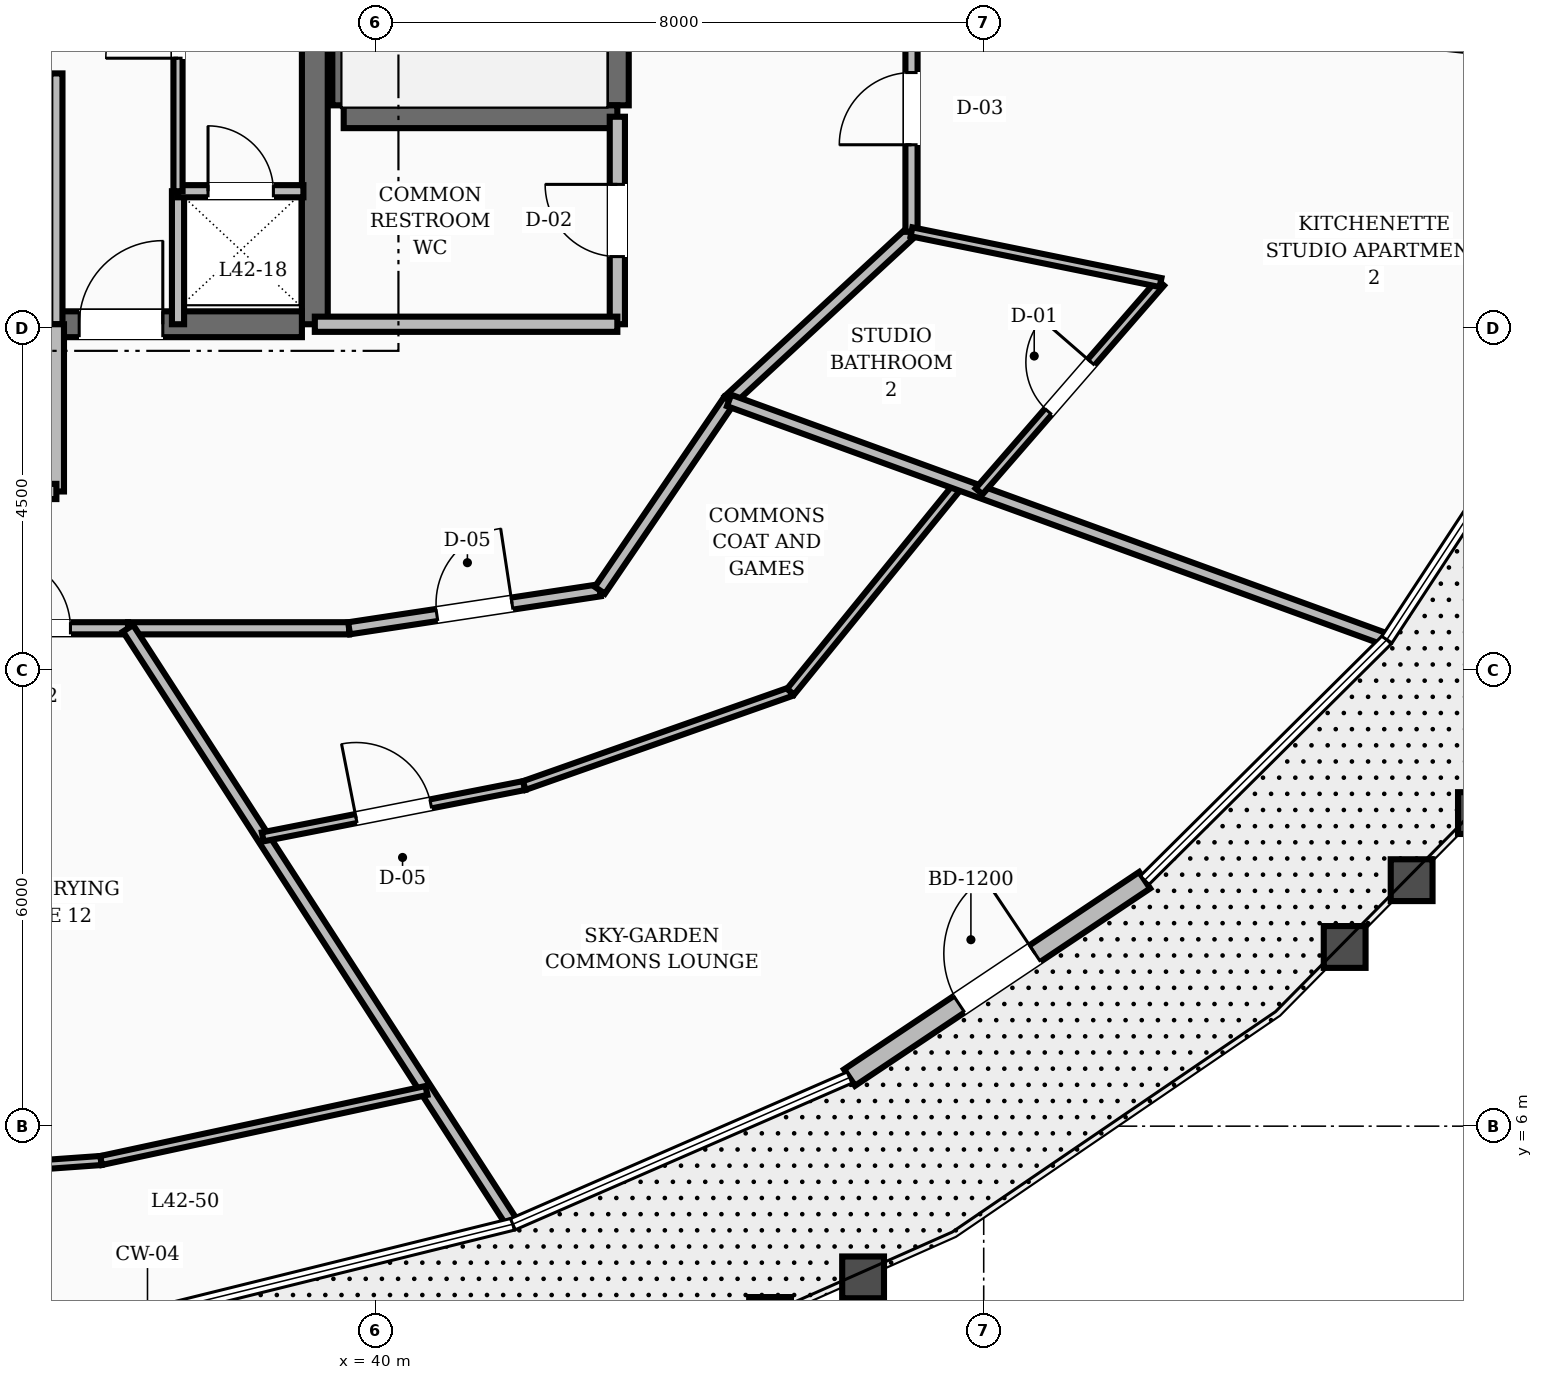
"""IFC4 building model, lengths in metres.
Left out: names, types, materials, properties, quantities, classifications, styles, units other than length and angle.
Written with IfcOpenShell. Run it as: python <this file> out.ifc"""

import sys

from ifc_helpers import new_model, si_unit, direction, frame, frame_2d, origin, place, context, subcontext, project, spatial, rectangle, extrude, element, fill, save


model = new_model("IFC4")
c1 = context("Model", 3, precision=1e-05, world=origin(), true_north=direction((0.0, 1.0)))
c2 = subcontext(c1, "Body", "Model", "MODEL_VIEW")
j1 = project(units=[si_unit("LENGTHUNIT", "METRE"), si_unit("PLANEANGLEUNIT", "RADIAN")], contexts=[c1])
p1 = place(None, origin())
s1 = spatial("IfcSite", under=j1, at=p1, CompositionType="ELEMENT")
p2 = place(p1, origin())
s2 = spatial("IfcBuilding", under=s1, at=p2, CompositionType="ELEMENT")
p3 = place(p2, frame((0.0, 0.0, 164.0)))
s3 = spatial("IfcBuildingStorey", under=s2, at=p3, CompositionType="ELEMENT", Elevation=164.0)
p4 = place(p3, frame((39.2, 16.55, 0.0), z_axis=(0.0, 0.0, 1.0), x_axis=(0.0, 1.0, 0.0)))
e1 = element("IfcWall", 1, at=p4, inside=s3, PredefinedType="SHEAR", context=c2, shape_type="SweptSolid", body=[
    extrude(rectangle(XDim=6.3, YDim=0.34, at=frame_2d((3.15, 0.0))), origin(), (0.0, 0.0, 1.0), 3.6),
])
p5 = place(p3, frame((35.8, 16.55, 0.0), z_axis=(0.0, 0.0, 1.0), x_axis=(1.0, 0.0, 0.0)))
e2 = element("IfcWall", 2, at=p5, inside=s3, PredefinedType="SHEAR", context=c2, shape_type="SweptSolid", body=[
    extrude(rectangle(XDim=3.23, YDim=0.34, at=frame_2d((1.615, 0.0))), origin(), (0.0, 0.0, 1.0), 3.6),
])
p6 = place(p5, frame((0.3, 0.0, 0.0)))
e3 = element("IfcOpeningElement", 3, at=p6, cuts=e2, PredefinedType="OPENING", context=c2, shape_type="SweptSolid", body=[
    extrude(rectangle(XDim=1.1, YDim=2.1, at=frame_2d((0.55, 1.05))), frame((0.0, 0.18, 0.0), z_axis=(0.0, -1.0, 0.0), x_axis=(1.0, 0.0, 0.0)), (0.0, 0.0, 1.0), 0.36),
])
for number, where, z_axis, x_axis in (
    (4, (43.18, 19.43, 0.0), (0.0, 0.0, 1.0), (0.0, 1.0, 0.0)),
    (5, (39.58, 19.43, 0.0), (0.0, 0.0, 1.0), (0.0, 1.0, 0.0)),
):
    element("IfcWall", number, at=place(p3, frame(where, z_axis=z_axis, x_axis=x_axis)), inside=s3, PredefinedType="SHEAR", context=c2, shape_type="SweptSolid", body=[
        extrude(rectangle(XDim=8.74, YDim=0.3, at=frame_2d((4.37, 0.0))), origin(), (0.0, 0.0, 1.0), 3.6),
    ])
p7 = place(p3, frame((39.58, 19.28, 0.0), z_axis=(0.0, 0.0, 1.0), x_axis=(1.0, 0.0, 0.0)))
e6 = element("IfcWall", 6, at=p7, inside=s3, PredefinedType="SHEAR", context=c2, shape_type="SweptSolid", body=[
    extrude(rectangle(XDim=3.6, YDim=0.3, at=frame_2d((1.8, 0.0))), origin(), (0.0, 0.0, 1.0), 3.6),
])
p8 = place(p3, frame((46.235, 6.639, 0.0), z_axis=(0.0, 0.0, 1.0), x_axis=(0.831245321174, 0.555905761821, 0.0)))
e7 = element("IfcWall", 7, at=p8, inside=s3, PredefinedType="STANDARD", context=c2, shape_type="SweptSolid", body=[
    extrude(rectangle(XDim=4.671, YDim=0.26, at=frame_2d((2.335, 0.0))), origin(), (0.0, 0.0, 1.0), 2.82),
])
p9 = place(p8, frame((1.736, 0.0, 0.0)))
e8 = element("IfcOpeningElement", 8, at=p9, cuts=e7, PredefinedType="OPENING", context=c2, shape_type="SweptSolid", body=[
    extrude(rectangle(XDim=1.2, YDim=2.15, at=frame_2d((0.6, 1.075))), frame((0.0, 0.14, 0.0), z_axis=(0.0, -1.0, 0.0), x_axis=(1.0, 0.0, 0.0)), (0.0, 0.0, 1.0), 0.28),
])
p10 = place(p3, frame((43.18, 16.55, 0.0), z_axis=(0.0, 0.0, 1.0), x_axis=(0.0, 1.0, 0.0)))
e9 = element("IfcWall", 9, at=p10, inside=s3, PredefinedType="SOLIDWALL", context=c2, shape_type="SweptSolid", body=[
    extrude(rectangle(XDim=2.73, YDim=0.2, at=frame_2d((1.365, 0.0))), origin(), (0.0, 0.0, 1.0), 2.8),
])
p11 = place(p10, frame((0.89, 0.0, 0.0)))
e10 = element("IfcOpeningElement", 10, at=p11, cuts=e9, PredefinedType="OPENING", context=c2, shape_type="SweptSolid", body=[
    extrude(rectangle(XDim=0.95, YDim=2.1, at=frame_2d((0.475, 1.05))), frame((0.0, 0.11, 0.0), z_axis=(0.0, -1.0, 0.0), x_axis=(1.0, 0.0, 0.0)), (0.0, 0.0, 1.0), 0.22),
])
p12 = place(p3, frame((39.2, 16.55, 0.0), z_axis=(0.0, 0.0, 1.0), x_axis=(1.0, 0.0, 0.0)))
e11 = element("IfcWall", 11, at=p12, inside=s3, PredefinedType="SOLIDWALL", context=c2, shape_type="SweptSolid", body=[
    extrude(rectangle(XDim=3.98, YDim=0.2, at=frame_2d((1.99, 0.0))), origin(), (0.0, 0.0, 1.0), 2.8),
])
p13 = place(p3, frame((35.8, 16.55, 0.0), z_axis=(0.0, 0.0, 1.0), x_axis=(0.0, 1.0, 0.0)))
e12 = element("IfcWall", 12, at=p13, inside=s3, PredefinedType="SOLIDWALL", context=c2, shape_type="SweptSolid", body=[
    extrude(rectangle(XDim=3.3, YDim=0.16, at=frame_2d((1.65, 0.0))), origin(), (0.0, 0.0, 1.0), 2.8),
])
p14 = place(p3, frame((37.4, 16.55, 0.0), z_axis=(0.0, 0.0, 1.0), x_axis=(0.0, 1.0, 0.0)))
e13 = element("IfcWall", 13, at=p14, inside=s3, PredefinedType="SOLIDWALL", context=c2, shape_type="SweptSolid", body=[
    extrude(rectangle(XDim=1.75, YDim=0.16, at=frame_2d((0.875, 0.0))), origin(), (0.0, 0.0, 1.0), 2.8),
])
p15 = place(p3, frame((35.8, 14.35, 0.0), z_axis=(0.0, 0.0, 1.0), x_axis=(0.0, 1.0, 0.0)))
e14 = element("IfcWall", 14, at=p15, inside=s3, PredefinedType="SOLIDWALL", context=c2, shape_type="SweptSolid", body=[
    extrude(rectangle(XDim=2.2, YDim=0.2, at=frame_2d((1.1, 0.0))), origin(), (0.0, 0.0, 1.0), 2.8),
])
p16 = place(p3, frame((28.2, 14.35, 0.0), z_axis=(0.0, 0.0, 1.0), x_axis=(1.0, 0.0, 0.0)))
e15 = element("IfcWall", 15, at=p16, inside=s3, PredefinedType="SOLIDWALL", context=c2, shape_type="SweptSolid", body=[
    extrude(rectangle(XDim=7.6, YDim=0.2, at=frame_2d((3.8, 0.0))), origin(), (0.0, 0.0, 1.0), 2.8),
])
p17 = place(p16, frame((3.2, 0.0, 0.0)))
e16 = element("IfcOpeningElement", 16, at=p17, cuts=e15, PredefinedType="OPENING", context=c2, shape_type="SweptSolid", body=[
    extrude(rectangle(XDim=1.2, YDim=2.1, at=frame_2d((0.6, 1.05))), frame((0.0, 0.11, 0.0), z_axis=(0.0, -1.0, 0.0), x_axis=(1.0, 0.0, 0.0)), (0.0, 0.0, 1.0), 0.22),
])
p18 = place(p3, frame((37.4, 18.3, 0.0), z_axis=(0.0, 0.0, 1.0), x_axis=(1.0, 0.0, 0.0)))
e17 = element("IfcWall", 17, at=p18, inside=s3, PredefinedType="SOLIDWALL", context=c2, shape_type="SweptSolid", body=[
    extrude(rectangle(XDim=1.65, YDim=0.16, at=frame_2d((0.825, 0.0))), origin(), (0.0, 0.0, 1.0), 2.8),
])
p19 = place(p18, frame((0.395, 0.0, 0.0)))
e18 = element("IfcOpeningElement", 18, at=p19, cuts=e17, PredefinedType="OPENING", context=c2, shape_type="SweptSolid", body=[
    extrude(rectangle(XDim=0.86, YDim=2.1, at=frame_2d((0.43, 1.05))), frame((0.0, 0.09, 0.0), z_axis=(0.0, -1.0, 0.0), x_axis=(1.0, 0.0, 0.0)), (0.0, 0.0, 1.0), 0.18),
])
p20 = place(p3, frame((37.4, 18.3, 0.0), z_axis=(0.0, 0.0, 1.0), x_axis=(0.0, 1.0, 0.0)))
e19 = element("IfcWall", 19, at=p20, inside=s3, PredefinedType="PARTITIONING", context=c2, shape_type="SweptSolid", body=[
    extrude(rectangle(XDim=4.45, YDim=0.12, at=frame_2d((2.225, 0.0))), origin(), (0.0, 0.0, 1.0), 2.8),
])
p21 = place(p20, frame((1.75, 0.0, 0.0)))
e20 = element("IfcOpeningElement", 20, at=p21, cuts=e19, PredefinedType="OPENING", context=c2, shape_type="SweptSolid", body=[
    extrude(rectangle(XDim=0.95, YDim=2.1, at=frame_2d((0.475, 1.05))), frame((0.0, 0.07, 0.0), z_axis=(0.0, -1.0, 0.0), x_axis=(1.0, 0.0, 0.0)), (0.0, 0.0, 1.0), 0.14),
])
p22 = place(p3, frame((34.278, 12.55, 0.0), z_axis=(0.0, 0.0, 1.0), x_axis=(1.0, 0.0, 0.0)))
e21 = element("IfcWall", 21, at=p22, inside=s3, PredefinedType="SOLIDWALL", context=c2, shape_type="SweptSolid", body=[
    extrude(rectangle(XDim=2.465, YDim=0.16, at=frame_2d((1.232, 0.0))), origin(), (0.0, 0.0, 1.0), 2.8),
])
p23 = place(p22, frame((0.758, 0.0, 0.0)))
e22 = element("IfcOpeningElement", 22, at=p23, cuts=e21, PredefinedType="OPENING", context=c2, shape_type="SweptSolid", body=[
    extrude(rectangle(XDim=0.95, YDim=2.1, at=frame_2d((0.475, 1.05))), frame((0.0, 0.09, 0.0), z_axis=(0.0, -1.0, 0.0), x_axis=(1.0, 0.0, 0.0)), (0.0, 0.0, 1.0), 0.18),
])
p24 = place(p3, frame((36.743, 12.55, 0.0), z_axis=(0.0, 0.0, 1.0), x_axis=(1.0, 0.0, 0.0)))
e23 = element("IfcWall", 23, at=p24, inside=s3, PredefinedType="SOLIDWALL", context=c2, shape_type="SweptSolid", body=[
    extrude(rectangle(XDim=2.908, YDim=0.16, at=frame_2d((1.454, 0.0))), origin(), (0.0, 0.0, 1.0), 2.8),
])
p25 = place(p3, frame((39.651, 12.55, 0.0), z_axis=(0.0, 0.0, 1.0), x_axis=(0.988710906508, 0.149835721217, 0.0)))
e24 = element("IfcWall", 24, at=p25, inside=s3, PredefinedType="SOLIDWALL", context=c2, shape_type="SweptSolid", body=[
    extrude(rectangle(XDim=3.337, YDim=0.16, at=frame_2d((1.668, 0.0))), origin(), (0.0, 0.0, 1.0), 2.8),
])
p26 = place(p25, frame((1.168, 0.0, 0.0)))
e25 = element("IfcOpeningElement", 25, at=p26, cuts=e24, PredefinedType="OPENING", context=c2, shape_type="SweptSolid", body=[
    extrude(rectangle(XDim=1.0, YDim=2.1, at=frame_2d((0.5, 1.05))), frame((0.0, 0.09, 0.0), z_axis=(0.0, -1.0, 0.0), x_axis=(1.0, 0.0, 0.0)), (0.0, 0.0, 1.0), 0.18),
])
p27 = place(p3, frame((42.95, 13.05, 0.0), z_axis=(0.0, 0.0, 1.0), x_axis=(0.562674669208, 0.826678423955, 0.0)))
e26 = element("IfcWall", 26, at=p27, inside=s3, PredefinedType="SOLIDWALL", context=c2, shape_type="SweptSolid", body=[
    extrude(rectangle(XDim=3.021, YDim=0.16, at=frame_2d((1.511, 0.0))), origin(), (0.0, 0.0, 1.0), 2.8),
])
p28 = place(p3, frame((44.65, 15.548, 0.0), z_axis=(0.0, 0.0, 1.0), x_axis=(0.734347936521, 0.678773237633, 0.0)))
e27 = element("IfcWall", 27, at=p28, inside=s3, PredefinedType="SOLIDWALL", context=c2, shape_type="SweptSolid", body=[
    extrude(rectangle(XDim=3.268, YDim=0.16, at=frame_2d((1.634, 0.0))), origin(), (0.0, 0.0, 1.0), 2.8),
])
p29 = place(p3, frame((47.05, 17.766, 0.0), z_axis=(0.0, 0.0, 1.0), x_axis=(0.0, 1.0, 0.0)))
e28 = element("IfcWall", 28, at=p29, inside=s3, PredefinedType="SOLIDWALL", context=c2, shape_type="SweptSolid", body=[
    extrude(rectangle(XDim=3.24, YDim=0.16, at=frame_2d((1.62, 0.0))), origin(), (0.0, 0.0, 1.0), 2.8),
])
p30 = place(p29, frame((1.145, 0.0, 0.0)))
e29 = element("IfcOpeningElement", 29, at=p30, cuts=e28, PredefinedType="OPENING", context=c2, shape_type="SweptSolid", body=[
    extrude(rectangle(XDim=0.95, YDim=2.1, at=frame_2d((0.475, 1.05))), frame((0.0, 0.09, 0.0), z_axis=(0.0, -1.0, 0.0), x_axis=(1.0, 0.0, 0.0)), (0.0, 0.0, 1.0), 0.18),
])
p31 = place(p3, frame((36.743, 12.55, 0.0), z_axis=(0.0, 0.0, 1.0), x_axis=(0.542459310628, -0.840082077129, 0.0)))
e30 = element("IfcWall", 30, at=p31, inside=s3, PredefinedType="SOLIDWALL", context=c2, shape_type="SweptSolid", body=[
    extrude(rectangle(XDim=9.282, YDim=0.16, at=frame_2d((4.641, 0.0))), origin(), (0.0, 0.0, 1.0), 2.8),
])
p32 = place(p3, frame((38.515, 9.806, 0.0), z_axis=(0.0, 0.0, 1.0), x_axis=(0.981276091141, 0.192606419819, 0.0)))
e31 = element("IfcWall", 31, at=p32, inside=s3, PredefinedType="PARTITIONING", context=c2, shape_type="SweptSolid", body=[
    extrude(rectangle(XDim=3.506, YDim=0.12, at=frame_2d((1.753, 0.0))), origin(), (0.0, 0.0, 1.0), 2.8),
])
p33 = place(p32, frame((1.253, 0.0, 0.0)))
e32 = element("IfcOpeningElement", 32, at=p33, cuts=e31, PredefinedType="OPENING", context=c2, shape_type="SweptSolid", body=[
    extrude(rectangle(XDim=1.0, YDim=2.1, at=frame_2d((0.5, 1.05))), frame((0.0, 0.07, 0.0), z_axis=(0.0, -1.0, 0.0), x_axis=(1.0, 0.0, 0.0)), (0.0, 0.0, 1.0), 0.14),
])
p34 = place(p3, frame((41.955, 10.481, 0.0), z_axis=(0.0, 0.0, 1.0), x_axis=(0.943218228091, 0.332173710875, 0.0)))
e33 = element("IfcWall", 33, at=p34, inside=s3, PredefinedType="PARTITIONING", context=c2, shape_type="SweptSolid", body=[
    extrude(rectangle(XDim=3.715, YDim=0.12, at=frame_2d((1.857, 0.0))), origin(), (0.0, 0.0, 1.0), 2.8),
])
p35 = place(p3, frame((45.459, 11.715, 0.0), z_axis=(0.0, 0.0, 1.0), x_axis=(0.630851136321, 0.775903888251, 0.0)))
e34 = element("IfcWall", 34, at=p35, inside=s3, PredefinedType="PARTITIONING", context=c2, shape_type="SweptSolid", body=[
    extrude(rectangle(XDim=3.519, YDim=0.12, at=frame_2d((1.76, 0.0))), origin(), (0.0, 0.0, 1.0), 2.8),
])
p36 = place(p3, frame((44.65, 15.548, 0.0), z_axis=(0.0, 0.0, 1.0), x_axis=(0.939767737395, -0.341813691579, 0.0)))
e35 = element("IfcWall", 35, at=p36, inside=s3, PredefinedType="SOLIDWALL", context=c2, shape_type="SweptSolid", body=[
    extrude(rectangle(XDim=9.159, YDim=0.16, at=frame_2d((4.58, 0.0))), origin(), (0.0, 0.0, 1.0), 2.8),
])
p37 = place(p3, frame((47.939, 14.351, 0.0), z_axis=(0.0, 0.0, 1.0), x_axis=(0.655979420757, 0.754778775233, 0.0)))
e36 = element("IfcWall", 36, at=p37, inside=s3, PredefinedType="PARTITIONING", context=c2, shape_type="SweptSolid", body=[
    extrude(rectangle(XDim=3.64, YDim=0.12, at=frame_2d((1.82, 0.0))), origin(), (0.0, 0.0, 1.0), 2.8),
])
p38 = place(p37, frame((1.39, 0.0, 0.0)))
e37 = element("IfcOpeningElement", 37, at=p38, cuts=e36, PredefinedType="OPENING", context=c2, shape_type="SweptSolid", body=[
    extrude(rectangle(XDim=0.86, YDim=2.1, at=frame_2d((0.43, 1.05))), frame((0.0, 0.07, 0.0), z_axis=(0.0, -1.0, 0.0), x_axis=(1.0, 0.0, 0.0)), (0.0, 0.0, 1.0), 0.14),
])
p39 = place(p3, frame((47.05, 17.766, 0.0), z_axis=(0.0, 0.0, 1.0), x_axis=(0.97987231708, -0.199625254463, 0.0)))
e38 = element("IfcWall", 38, at=p39, inside=s3, PredefinedType="PARTITIONING", context=c2, shape_type="SweptSolid", body=[
    extrude(rectangle(XDim=3.344, YDim=0.12, at=frame_2d((1.672, 0.0))), origin(), (0.0, 0.0, 1.0), 2.8),
])
p40 = place(p3, frame((47.05, 21.006, 0.0), z_axis=(0.0, 0.0, 1.0), x_axis=(0.994311076529, -0.106515177757, 0.0)))
e39 = element("IfcWall", 39, at=p40, inside=s3, PredefinedType="SOLIDWALL", context=c2, shape_type="SweptSolid", body=[
    extrude(rectangle(XDim=10.087, YDim=0.16, at=frame_2d((5.044, 0.0))), origin(), (0.0, 0.0, 1.0), 2.8),
])
p41 = place(p3, frame((32.0, 5.237, 0.0), z_axis=(0.0, 0.0, 1.0), x_axis=(0.997496872259, 0.070710606235, 0.0)))
e40 = element("IfcWall", 40, at=p41, inside=s3, PredefinedType="PARTITIONING", context=c2, shape_type="SweptSolid", body=[
    extrude(rectangle(XDim=4.399, YDim=0.12, at=frame_2d((2.199, 0.0))), origin(), (0.0, 0.0, 1.0), 2.8),
])
p42 = place(p41, frame((1.724, 0.0, 0.0)))
e41 = element("IfcOpeningElement", 41, at=p42, cuts=e40, PredefinedType="OPENING", context=c2, shape_type="SweptSolid", body=[
    extrude(rectangle(XDim=0.95, YDim=2.1, at=frame_2d((0.475, 1.05))), frame((0.0, 0.07, 0.0), z_axis=(0.0, -1.0, 0.0), x_axis=(1.0, 0.0, 0.0)), (0.0, 0.0, 1.0), 0.14),
])
p43 = place(p3, frame((36.388, 5.548, 0.0), z_axis=(0.0, 0.0, 1.0), x_axis=(0.977604548962, 0.210450340576, 0.0)))
e42 = element("IfcWall", 42, at=p43, inside=s3, PredefinedType="PARTITIONING", context=c2, shape_type="SweptSolid", body=[
    extrude(rectangle(XDim=4.379, YDim=0.12, at=frame_2d((2.19, 0.0))), origin(), (0.0, 0.0, 1.0), 2.8),
])
p44 = place(p9, origin())
e43 = element("IfcDoor", 43, at=p44, inside=s3, OperationType="SINGLE_SWING_RIGHT", PredefinedType="DOOR", context=c2, shape_type="SweptSolid", body=[
    extrude(rectangle(XDim=1.2, YDim=2.15, at=frame_2d((0.6, 1.075))), frame((0.0, 0.025, 0.0), z_axis=(0.0, -1.0, 0.0), x_axis=(1.0, 0.0, 0.0)), (0.0, 0.0, 1.0), 0.05),
])
fill(e8, e43)
p45 = place(p11, origin())
e44 = element("IfcDoor", 44, at=p45, inside=s3, OperationType="SINGLE_SWING_RIGHT", PredefinedType="DOOR", context=c2, shape_type="SweptSolid", body=[
    extrude(rectangle(XDim=0.95, YDim=2.1, at=frame_2d((0.475, 1.05))), frame((0.0, 0.025, 0.0), z_axis=(0.0, -1.0, 0.0), x_axis=(1.0, 0.0, 0.0)), (0.0, 0.0, 1.0), 0.05),
])
fill(e10, e44)
p46 = place(p6, origin())
e45 = element("IfcDoor", 45, at=p46, inside=s3, OperationType="SINGLE_SWING_RIGHT", PredefinedType="DOOR", context=c2, shape_type="SweptSolid", body=[
    extrude(rectangle(XDim=1.1, YDim=2.1, at=frame_2d((0.55, 1.05))), frame((0.0, 0.025, 0.0), z_axis=(0.0, -1.0, 0.0), x_axis=(1.0, 0.0, 0.0)), (0.0, 0.0, 1.0), 0.05),
])
fill(e3, e45)
p47 = place(p19, origin())
e46 = element("IfcDoor", 46, at=p47, inside=s3, OperationType="SINGLE_SWING_LEFT", PredefinedType="TRAPDOOR", context=c2, shape_type="SweptSolid", body=[
    extrude(rectangle(XDim=0.86, YDim=2.1, at=frame_2d((0.43, 1.05))), frame((0.0, 0.025, 0.0), z_axis=(0.0, -1.0, 0.0), x_axis=(1.0, 0.0, 0.0)), (0.0, 0.0, 1.0), 0.05),
])
fill(e18, e46)
p48 = place(p21, origin())
e47 = element("IfcDoor", 47, at=p48, inside=s3, OperationType="SINGLE_SWING_LEFT", PredefinedType="DOOR", context=c2, shape_type="SweptSolid", body=[
    extrude(rectangle(XDim=0.95, YDim=2.1, at=frame_2d((0.475, 1.05))), frame((0.0, 0.025, 0.0), z_axis=(0.0, -1.0, 0.0), x_axis=(1.0, 0.0, 0.0)), (0.0, 0.0, 1.0), 0.05),
])
fill(e20, e47)
p49 = place(p26, origin())
e48 = element("IfcDoor", 48, at=p49, inside=s3, OperationType="SINGLE_SWING_RIGHT", PredefinedType="DOOR", context=c2, shape_type="SweptSolid", body=[
    extrude(rectangle(XDim=1.0, YDim=2.1, at=frame_2d((0.5, 1.05))), frame((0.0, 0.025, 0.0), z_axis=(0.0, -1.0, 0.0), x_axis=(1.0, 0.0, 0.0)), (0.0, 0.0, 1.0), 0.05),
])
fill(e25, e48)
p50 = place(p33, origin())
e49 = element("IfcDoor", 49, at=p50, inside=s3, OperationType="SINGLE_SWING_LEFT", PredefinedType="DOOR", context=c2, shape_type="SweptSolid", body=[
    extrude(rectangle(XDim=1.0, YDim=2.1, at=frame_2d((0.5, 1.05))), frame((0.0, 0.025, 0.0), z_axis=(0.0, -1.0, 0.0), x_axis=(1.0, 0.0, 0.0)), (0.0, 0.0, 1.0), 0.05),
])
fill(e32, e49)
p51 = place(p38, origin())
e50 = element("IfcDoor", 50, at=p51, inside=s3, OperationType="SINGLE_SWING_RIGHT", PredefinedType="DOOR", context=c2, shape_type="SweptSolid", body=[
    extrude(rectangle(XDim=0.86, YDim=2.1, at=frame_2d((0.43, 1.05))), frame((0.0, 0.025, 0.0), z_axis=(0.0, -1.0, 0.0), x_axis=(1.0, 0.0, 0.0)), (0.0, 0.0, 1.0), 0.05),
])
fill(e37, e50)
p52 = place(p30, origin())
e51 = element("IfcDoor", 51, at=p52, inside=s3, OperationType="SINGLE_SWING_LEFT", PredefinedType="DOOR", context=c2, shape_type="SweptSolid", body=[
    extrude(rectangle(XDim=0.95, YDim=2.1, at=frame_2d((0.475, 1.05))), frame((0.0, 0.025, 0.0), z_axis=(0.0, -1.0, 0.0), x_axis=(1.0, 0.0, 0.0)), (0.0, 0.0, 1.0), 0.05),
])
fill(e29, e51)
p53 = place(p23, origin())
e52 = element("IfcDoor", 52, at=p53, inside=s3, OperationType="SINGLE_SWING_LEFT", PredefinedType="DOOR", context=c2, shape_type="SweptSolid", body=[
    extrude(rectangle(XDim=0.95, YDim=2.1, at=frame_2d((0.475, 1.05))), frame((0.0, 0.025, 0.0), z_axis=(0.0, -1.0, 0.0), x_axis=(1.0, 0.0, 0.0)), (0.0, 0.0, 1.0), 0.05),
])
fill(e22, e52)
save(model, sys.argv[1])
